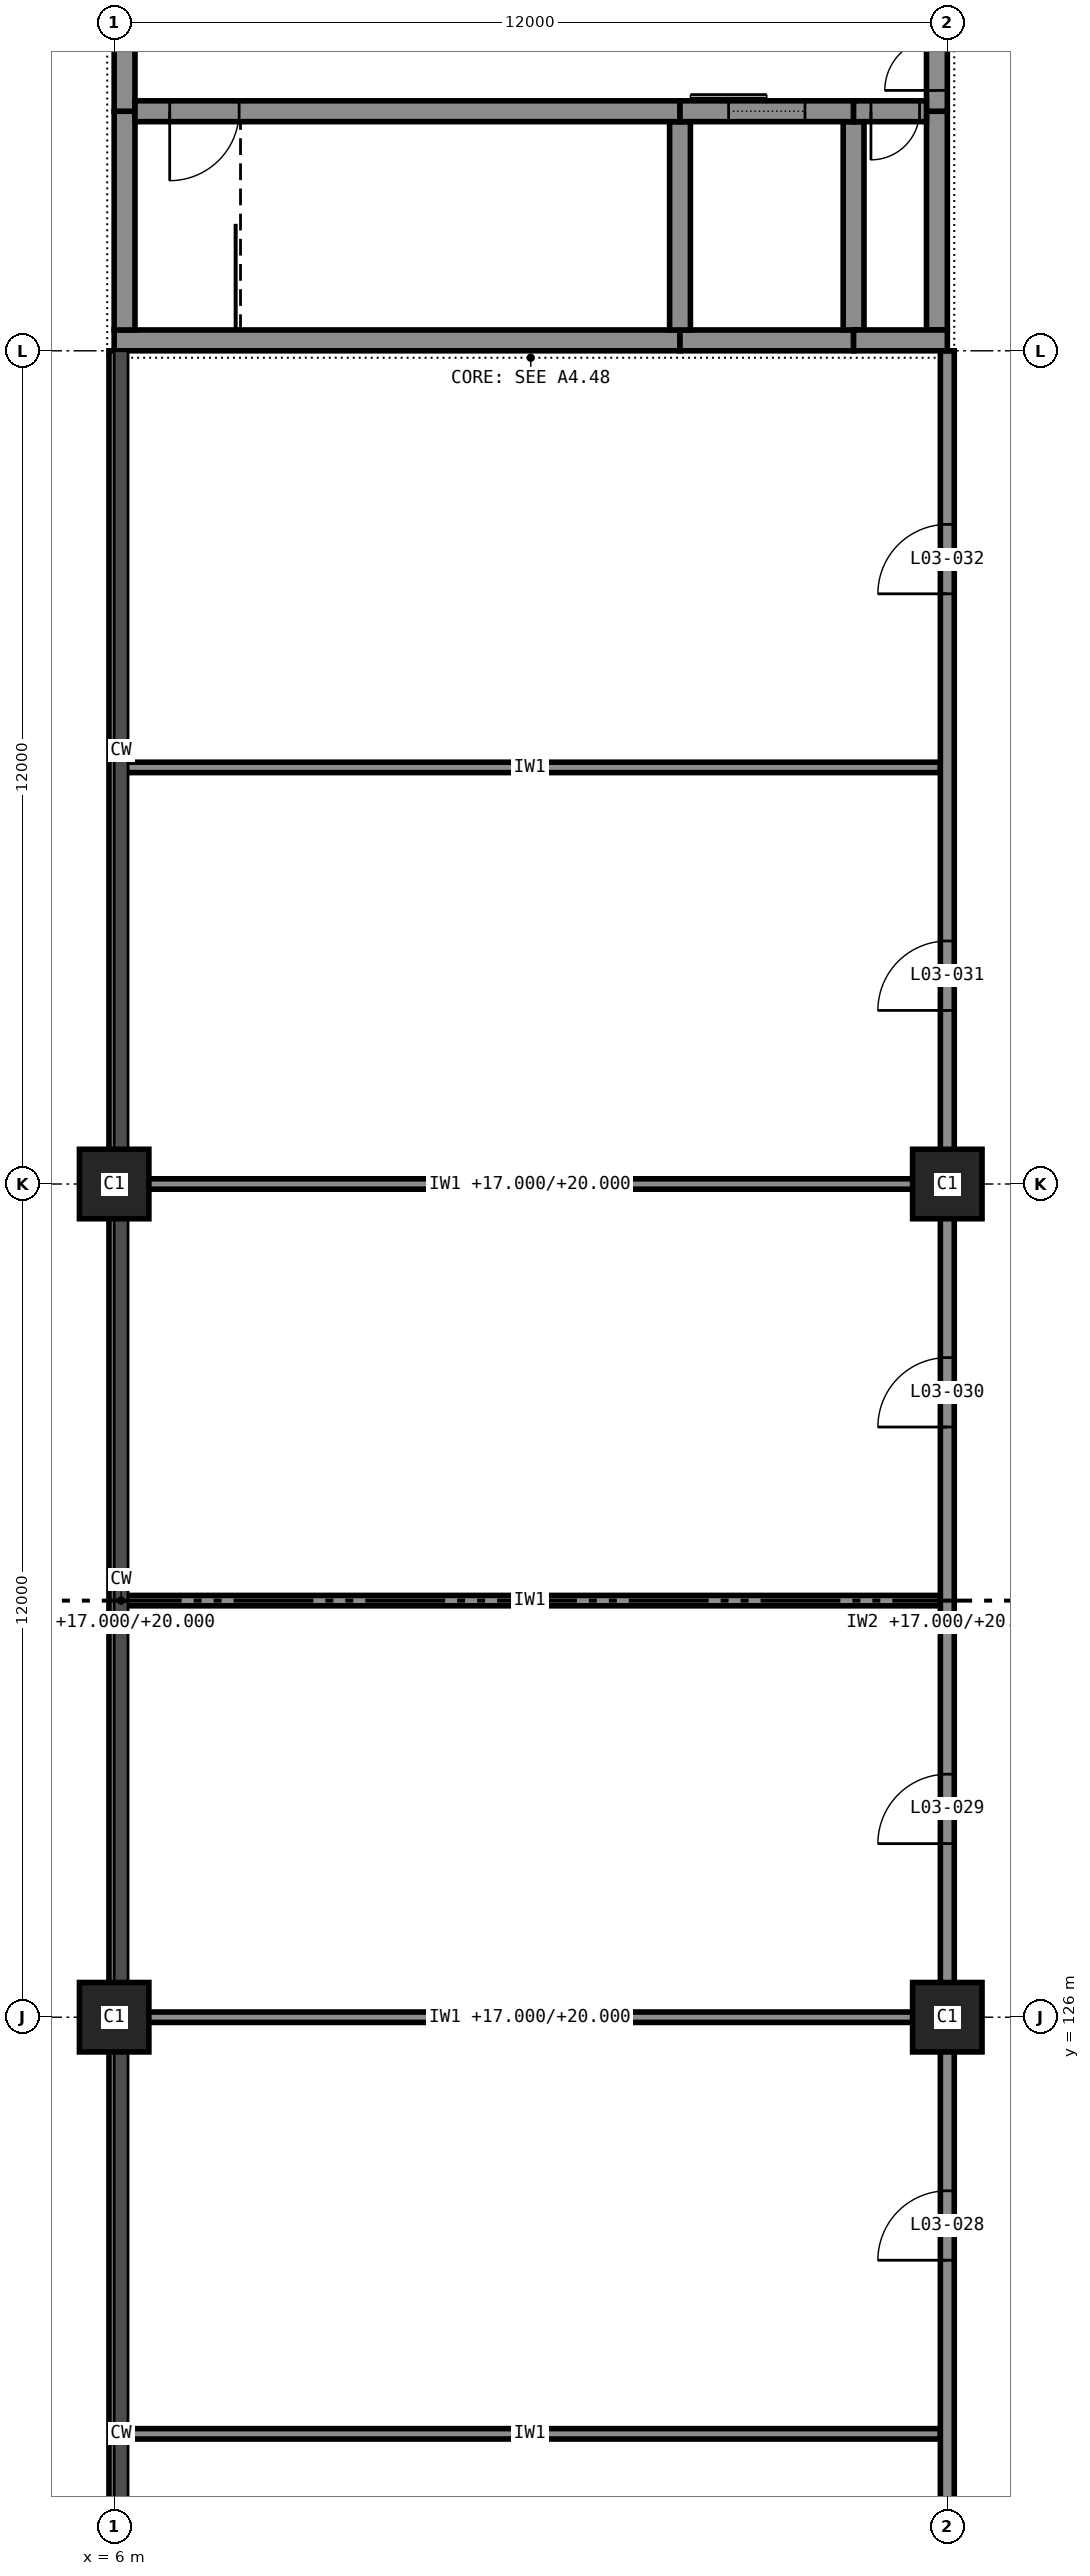
"""IFC4 building model, lengths in metres.
Left out: names, types, materials, properties, quantities, classifications, styles, units other than length and angle.
Written with IfcOpenShell. Run it as: python <this file> out.ifc"""

import sys

from ifc_helpers import new_model, si_unit, direction, frame, frame_2d, origin, origin_2d, place, context, subcontext, project, spatial, rectangle, extrude, element, fill, save


model = new_model("IFC4")
c1 = context("Model", 3, precision=1e-05, world=origin(), true_north=direction((0.0, 1.0)))
c2 = subcontext(c1, "Body", "Model", "MODEL_VIEW")
j1 = project(units=[si_unit("LENGTHUNIT", "METRE"), si_unit("PLANEANGLEUNIT", "RADIAN")], contexts=[c1])
p1 = place(None, origin())
s1 = spatial("IfcSite", under=j1, at=p1, CompositionType="ELEMENT")
p2 = place(p1, origin())
s2 = spatial("IfcBuilding", under=s1, at=p2, CompositionType="ELEMENT")
p3 = place(p2, frame((0.0, 0.0, 17.0)))
s3 = spatial("IfcBuildingStorey", under=s2, at=p3, CompositionType="ELEMENT", Elevation=17.0)
for number, where, z_axis, x_axis in (
    (1, (6.0, 126.0, 0.0), (0.0, 0.0, 1.0), (1.0, 0.0, 0.0)),
    (2, (6.0, 138.0, 0.0), (0.0, 0.0, 1.0), (1.0, 0.0, 0.0)),
    (3, (18.0, 126.0, 0.0), (0.0, 0.0, 1.0), (1.0, 0.0, 0.0)),
    (4, (18.0, 138.0, 0.0), (0.0, 0.0, 1.0), (1.0, 0.0, 0.0)),
):
    element("IfcColumn", number, at=place(p3, frame(where, z_axis=z_axis, x_axis=x_axis)), inside=s3, PredefinedType="COLUMN", context=c2, shape_type="SweptSolid", body=[
        extrude(rectangle(XDim=1.0, YDim=1.0, at=origin_2d()), origin(), (0.0, 0.0, 1.0), 4.0),
    ])
p4 = place(p3, frame((6.0, 150.15, 0.0), z_axis=(0.0, 0.0, 1.0), x_axis=(1.0, 0.0, 0.0)))
e5 = element("IfcWall", 5, at=p4, inside=s3, PredefinedType="SHEAR", context=c2, shape_type="SweptSolid", body=[
    extrude(rectangle(XDim=8.15, YDim=0.3, at=frame_2d((4.075, 0.0))), origin(), (0.0, 0.0, 1.0), 3.8),
])
p5 = place(p3, frame((14.15, 150.15, 0.0), z_axis=(0.0, 0.0, 1.0), x_axis=(1.0, 0.0, 0.0)))
e6 = element("IfcWall", 6, at=p5, inside=s3, PredefinedType="SHEAR", context=c2, shape_type="SweptSolid", body=[
    extrude(rectangle(XDim=2.5, YDim=0.3, at=frame_2d((1.25, 0.0))), origin(), (0.0, 0.0, 1.0), 3.8),
])
p6 = place(p3, frame((16.65, 150.15, 0.0), z_axis=(0.0, 0.0, 1.0), x_axis=(1.0, 0.0, 0.0)))
e7 = element("IfcWall", 7, at=p6, inside=s3, PredefinedType="SHEAR", context=c2, shape_type="SweptSolid", body=[
    extrude(rectangle(XDim=1.35, YDim=0.3, at=frame_2d((0.675, 0.0))), origin(), (0.0, 0.0, 1.0), 3.8),
])
p7 = place(p3, frame((6.3, 153.45, 0.0), z_axis=(0.0, 0.0, 1.0), x_axis=(1.0, 0.0, 0.0)))
e8 = element("IfcWall", 8, at=p7, inside=s3, PredefinedType="SHEAR", context=c2, shape_type="SweptSolid", body=[
    extrude(rectangle(XDim=7.85, YDim=0.3, at=frame_2d((3.925, 0.0))), origin(), (0.0, 0.0, 1.0), 3.8),
])
p8 = place(p7, frame((0.5, 0.0, 0.0)))
e9 = element("IfcOpeningElement", 9, at=p8, cuts=e8, PredefinedType="OPENING", context=c2, shape_type="SweptSolid", body=[
    extrude(rectangle(XDim=1.0, YDim=2.1, at=frame_2d((0.5, 1.05))), frame((0.0, 0.16, 0.0), z_axis=(0.0, -1.0, 0.0), x_axis=(1.0, 0.0, 0.0)), (0.0, 0.0, 1.0), 0.32),
])
p9 = place(p3, frame((14.15, 153.45, 0.0), z_axis=(0.0, 0.0, 1.0), x_axis=(1.0, 0.0, 0.0)))
e10 = element("IfcWall", 10, at=p9, inside=s3, PredefinedType="SHEAR", context=c2, shape_type="SweptSolid", body=[
    extrude(rectangle(XDim=2.5, YDim=0.3, at=frame_2d((1.25, 0.0))), origin(), (0.0, 0.0, 1.0), 3.8),
])
p10 = place(p9, frame((0.7, 0.0, 0.0)))
e11 = element("IfcOpeningElement", 11, at=p10, cuts=e10, PredefinedType="OPENING", context=c2, shape_type="SweptSolid", body=[
    extrude(rectangle(XDim=1.1, YDim=2.1, at=frame_2d((0.55, 1.05))), frame((0.0, 0.16, 0.0), z_axis=(0.0, -1.0, 0.0), x_axis=(1.0, 0.0, 0.0)), (0.0, 0.0, 1.0), 0.32),
])
p11 = place(p3, frame((16.65, 153.45, 0.0), z_axis=(0.0, 0.0, 1.0), x_axis=(1.0, 0.0, 0.0)))
e12 = element("IfcWall", 12, at=p11, inside=s3, PredefinedType="SHEAR", context=c2, shape_type="SweptSolid", body=[
    extrude(rectangle(XDim=1.05, YDim=0.3, at=frame_2d((0.525, 0.0))), origin(), (0.0, 0.0, 1.0), 3.8),
])
p12 = place(p11, frame((0.25, 0.0, 0.0)))
e13 = element("IfcOpeningElement", 13, at=p12, cuts=e12, PredefinedType="OPENING", context=c2, shape_type="SweptSolid", body=[
    extrude(rectangle(XDim=0.7, YDim=2.1, at=frame_2d((0.35, 1.05))), frame((0.0, 0.16, 0.0), z_axis=(0.0, -1.0, 0.0), x_axis=(1.0, 0.0, 0.0)), (0.0, 0.0, 1.0), 0.32),
])
p13 = place(p3, frame((6.15, 150.3, 0.0), z_axis=(0.0, 0.0, 1.0), x_axis=(0.0, 1.0, 0.0)))
e14 = element("IfcWall", 14, at=p13, inside=s3, PredefinedType="SHEAR", context=c2, shape_type="SweptSolid", body=[
    extrude(rectangle(XDim=3.15, YDim=0.3, at=frame_2d((1.575, 0.0))), origin(), (0.0, 0.0, 1.0), 3.8),
])
p14 = place(p3, frame((6.15, 153.45, 0.0), z_axis=(0.0, 0.0, 1.0), x_axis=(0.0, 1.0, 0.0)))
e15 = element("IfcWall", 15, at=p14, inside=s3, PredefinedType="SHEAR", context=c2, shape_type="SweptSolid", body=[
    extrude(rectangle(XDim=5.1, YDim=0.3, at=frame_2d((2.55, 0.0))), origin(), (0.0, 0.0, 1.0), 3.8),
])
p15 = place(p3, frame((17.85, 150.3, 0.0), z_axis=(0.0, 0.0, 1.0), x_axis=(0.0, 1.0, 0.0)))
e16 = element("IfcWall", 16, at=p15, inside=s3, PredefinedType="SHEAR", context=c2, shape_type="SweptSolid", body=[
    extrude(rectangle(XDim=3.15, YDim=0.3, at=frame_2d((1.575, 0.0))), origin(), (0.0, 0.0, 1.0), 3.8),
])
p16 = place(p3, frame((17.85, 153.45, 0.0), z_axis=(0.0, 0.0, 1.0), x_axis=(0.0, 1.0, 0.0)))
e17 = element("IfcWall", 17, at=p16, inside=s3, PredefinedType="SHEAR", context=c2, shape_type="SweptSolid", body=[
    extrude(rectangle(XDim=5.1, YDim=0.3, at=frame_2d((2.55, 0.0))), origin(), (0.0, 0.0, 1.0), 3.8),
])
p17 = place(p16, frame((0.3, 0.0, 0.0)))
e18 = element("IfcOpeningElement", 18, at=p17, cuts=e17, PredefinedType="OPENING", context=c2, shape_type="SweptSolid", body=[
    extrude(rectangle(XDim=1.5, YDim=2.1, at=frame_2d((0.75, 1.05))), frame((0.0, 0.16, 0.0), z_axis=(0.0, -1.0, 0.0), x_axis=(1.0, 0.0, 0.0)), (0.0, 0.0, 1.0), 0.32),
])
for number, where, z_axis, x_axis in (
    (19, (14.15, 150.3, 0.0), (0.0, 0.0, 1.0), (0.0, 1.0, 0.0)),
    (20, (16.65, 150.3, 0.0), (0.0, 0.0, 1.0), (0.0, 1.0, 0.0)),
):
    element("IfcWall", number, at=place(p3, frame(where, z_axis=z_axis, x_axis=x_axis)), inside=s3, PredefinedType="SHEAR", context=c2, shape_type="SweptSolid", body=[
        extrude(rectangle(XDim=3.0, YDim=0.3, at=frame_2d((1.5, 0.0))), origin(), (0.0, 0.0, 1.0), 3.8),
    ])
p18 = place(p3, frame((6.075, 120.0, 0.0), z_axis=(0.0, 0.0, 1.0), x_axis=(1.0, 0.0, 0.0)))
e21 = element("IfcWall", 21, at=p18, inside=s3, PredefinedType="PARTITIONING", context=c2, shape_type="SweptSolid", body=[
    extrude(rectangle(XDim=11.825, YDim=0.15, at=frame_2d((5.913, 0.0))), origin(), (0.0, 0.0, 1.0), 3.8),
])
p19 = place(p3, frame((6.075, 126.0, 0.0), z_axis=(0.0, 0.0, 1.0), x_axis=(1.0, 0.0, 0.0)))
e22 = element("IfcWall", 22, at=p19, inside=s3, PredefinedType="PARTITIONING", context=c2, shape_type="SweptSolid", body=[
    extrude(rectangle(XDim=11.825, YDim=0.15, at=frame_2d((5.913, 0.0))), origin(), (0.0, 0.0, 1.0), 3.0),
])
p20 = place(p3, frame((6.075, 132.0, 0.0), z_axis=(0.0, 0.0, 1.0), x_axis=(1.0, 0.0, 0.0)))
e23 = element("IfcWall", 23, at=p20, inside=s3, PredefinedType="PARTITIONING", context=c2, shape_type="SweptSolid", body=[
    extrude(rectangle(XDim=11.825, YDim=0.15, at=frame_2d((5.913, 0.0))), origin(), (0.0, 0.0, 1.0), 3.8),
])
p21 = place(p3, frame((6.075, 138.0, 0.0), z_axis=(0.0, 0.0, 1.0), x_axis=(1.0, 0.0, 0.0)))
e24 = element("IfcWall", 24, at=p21, inside=s3, PredefinedType="PARTITIONING", context=c2, shape_type="SweptSolid", body=[
    extrude(rectangle(XDim=11.825, YDim=0.15, at=frame_2d((5.913, 0.0))), origin(), (0.0, 0.0, 1.0), 3.0),
])
p22 = place(p3, frame((6.075, 144.0, 0.0), z_axis=(0.0, 0.0, 1.0), x_axis=(1.0, 0.0, 0.0)))
e25 = element("IfcWall", 25, at=p22, inside=s3, PredefinedType="PARTITIONING", context=c2, shape_type="SweptSolid", body=[
    extrude(rectangle(XDim=11.825, YDim=0.15, at=frame_2d((5.913, 0.0))), origin(), (0.0, 0.0, 1.0), 3.8),
])
p23 = place(p3, frame((6.0, 102.0, 0.0), z_axis=(0.0, 0.0, 1.0), x_axis=(0.0, 1.0, 0.0)))
e26 = element("IfcWall", 26, at=p23, inside=s3, PredefinedType="PARTITIONING", context=c2, shape_type="SweptSolid", body=[
    extrude(rectangle(XDim=48.0, YDim=0.15, at=frame_2d((24.0, 0.0))), origin(), (0.0, 0.0, 1.0), 3.0),
])
p24 = place(p3, frame((18.0, 102.0, 0.0), z_axis=(0.0, 0.0, 1.0), x_axis=(0.0, 1.0, 0.0)))
e27 = element("IfcWall", 27, at=p24, inside=s3, PredefinedType="PARTITIONING", context=c2, shape_type="SweptSolid", body=[
    extrude(rectangle(XDim=48.0, YDim=0.2, at=frame_2d((24.0, 0.0))), origin(), (0.0, 0.0, 1.0), 3.0),
])
p25 = place(p24, frame((2.5, 0.0, 0.0)))
e28 = element("IfcOpeningElement", 28, at=p25, cuts=e27, PredefinedType="OPENING", context=c2, shape_type="SweptSolid", body=[
    extrude(rectangle(XDim=1.0, YDim=2.1, at=frame_2d((0.5, 1.05))), frame((0.0, 0.11, 0.0), z_axis=(0.0, -1.0, 0.0), x_axis=(1.0, 0.0, 0.0)), (0.0, 0.0, 1.0), 0.22),
])
p26 = place(p24, frame((8.5, 0.0, 0.0)))
e29 = element("IfcOpeningElement", 29, at=p26, cuts=e27, PredefinedType="OPENING", context=c2, shape_type="SweptSolid", body=[
    extrude(rectangle(XDim=1.0, YDim=2.1, at=frame_2d((0.5, 1.05))), frame((0.0, 0.11, 0.0), z_axis=(0.0, -1.0, 0.0), x_axis=(1.0, 0.0, 0.0)), (0.0, 0.0, 1.0), 0.22),
])
p27 = place(p24, frame((14.5, 0.0, 0.0)))
e30 = element("IfcOpeningElement", 30, at=p27, cuts=e27, PredefinedType="OPENING", context=c2, shape_type="SweptSolid", body=[
    extrude(rectangle(XDim=1.0, YDim=2.1, at=frame_2d((0.5, 1.05))), frame((0.0, 0.11, 0.0), z_axis=(0.0, -1.0, 0.0), x_axis=(1.0, 0.0, 0.0)), (0.0, 0.0, 1.0), 0.22),
])
p28 = place(p24, frame((20.5, 0.0, 0.0)))
e31 = element("IfcOpeningElement", 31, at=p28, cuts=e27, PredefinedType="OPENING", context=c2, shape_type="SweptSolid", body=[
    extrude(rectangle(XDim=1.0, YDim=2.1, at=frame_2d((0.5, 1.05))), frame((0.0, 0.11, 0.0), z_axis=(0.0, -1.0, 0.0), x_axis=(1.0, 0.0, 0.0)), (0.0, 0.0, 1.0), 0.22),
])
p29 = place(p24, frame((26.5, 0.0, 0.0)))
e32 = element("IfcOpeningElement", 32, at=p29, cuts=e27, PredefinedType="OPENING", context=c2, shape_type="SweptSolid", body=[
    extrude(rectangle(XDim=1.0, YDim=2.1, at=frame_2d((0.5, 1.05))), frame((0.0, 0.11, 0.0), z_axis=(0.0, -1.0, 0.0), x_axis=(1.0, 0.0, 0.0)), (0.0, 0.0, 1.0), 0.22),
])
p30 = place(p24, frame((32.5, 0.0, 0.0)))
e33 = element("IfcOpeningElement", 33, at=p30, cuts=e27, PredefinedType="OPENING", context=c2, shape_type="SweptSolid", body=[
    extrude(rectangle(XDim=1.0, YDim=2.1, at=frame_2d((0.5, 1.05))), frame((0.0, 0.11, 0.0), z_axis=(0.0, -1.0, 0.0), x_axis=(1.0, 0.0, 0.0)), (0.0, 0.0, 1.0), 0.22),
])
p31 = place(p24, frame((38.5, 0.0, 0.0)))
e34 = element("IfcOpeningElement", 34, at=p31, cuts=e27, PredefinedType="OPENING", context=c2, shape_type="SweptSolid", body=[
    extrude(rectangle(XDim=1.0, YDim=2.1, at=frame_2d((0.5, 1.05))), frame((0.0, 0.11, 0.0), z_axis=(0.0, -1.0, 0.0), x_axis=(1.0, 0.0, 0.0)), (0.0, 0.0, 1.0), 0.22),
])
p32 = place(p24, frame((44.5, 0.0, 0.0)))
e35 = element("IfcOpeningElement", 35, at=p32, cuts=e27, PredefinedType="OPENING", context=c2, shape_type="SweptSolid", body=[
    extrude(rectangle(XDim=1.0, YDim=2.1, at=frame_2d((0.5, 1.05))), frame((0.0, 0.11, 0.0), z_axis=(0.0, -1.0, 0.0), x_axis=(1.0, 0.0, 0.0)), (0.0, 0.0, 1.0), 0.22),
])
p33 = place(p28, origin())
e36 = element("IfcDoor", 36, at=p33, inside=s3, OperationType="SINGLE_SWING_RIGHT", PredefinedType="DOOR", context=c2, shape_type="SweptSolid", body=[
    extrude(rectangle(XDim=1.0, YDim=2.1, at=frame_2d((0.5, 1.05))), frame((0.0, 0.025, 0.0), z_axis=(0.0, -1.0, 0.0), x_axis=(1.0, 0.0, 0.0)), (0.0, 0.0, 1.0), 0.05),
])
fill(e31, e36)
p34 = place(p29, origin())
e37 = element("IfcDoor", 37, at=p34, inside=s3, OperationType="SINGLE_SWING_RIGHT", PredefinedType="DOOR", context=c2, shape_type="SweptSolid", body=[
    extrude(rectangle(XDim=1.0, YDim=2.1, at=frame_2d((0.5, 1.05))), frame((0.0, 0.025, 0.0), z_axis=(0.0, -1.0, 0.0), x_axis=(1.0, 0.0, 0.0)), (0.0, 0.0, 1.0), 0.05),
])
fill(e32, e37)
p35 = place(p30, origin())
e38 = element("IfcDoor", 38, at=p35, inside=s3, OperationType="SINGLE_SWING_RIGHT", PredefinedType="DOOR", context=c2, shape_type="SweptSolid", body=[
    extrude(rectangle(XDim=1.0, YDim=2.1, at=frame_2d((0.5, 1.05))), frame((0.0, 0.025, 0.0), z_axis=(0.0, -1.0, 0.0), x_axis=(1.0, 0.0, 0.0)), (0.0, 0.0, 1.0), 0.05),
])
fill(e33, e38)
p36 = place(p31, origin())
e39 = element("IfcDoor", 39, at=p36, inside=s3, OperationType="SINGLE_SWING_RIGHT", PredefinedType="DOOR", context=c2, shape_type="SweptSolid", body=[
    extrude(rectangle(XDim=1.0, YDim=2.1, at=frame_2d((0.5, 1.05))), frame((0.0, 0.025, 0.0), z_axis=(0.0, -1.0, 0.0), x_axis=(1.0, 0.0, 0.0)), (0.0, 0.0, 1.0), 0.05),
])
fill(e34, e39)
p37 = place(p32, origin())
e40 = element("IfcDoor", 40, at=p37, inside=s3, OperationType="SINGLE_SWING_RIGHT", PredefinedType="DOOR", context=c2, shape_type="SweptSolid", body=[
    extrude(rectangle(XDim=1.0, YDim=2.1, at=frame_2d((0.5, 1.05))), frame((0.0, 0.025, 0.0), z_axis=(0.0, -1.0, 0.0), x_axis=(1.0, 0.0, 0.0)), (0.0, 0.0, 1.0), 0.05),
])
fill(e35, e40)
p38 = place(p8, frame((1.0, 0.0, 0.0), z_axis=(0.0, 0.0, 1.0), x_axis=(-1.0, 0.0, 0.0)))
e41 = element("IfcDoor", 41, at=p38, inside=s3, OperationType="SINGLE_SWING_LEFT", PredefinedType="DOOR", context=c2, shape_type="SweptSolid", body=[
    extrude(rectangle(XDim=1.0, YDim=2.1, at=frame_2d((0.5, 1.05))), frame((0.0, 0.025, 0.0), z_axis=(0.0, -1.0, 0.0), x_axis=(1.0, 0.0, 0.0)), (0.0, 0.0, 1.0), 0.05),
])
fill(e9, e41)
p39 = place(p10, origin())
e42 = element("IfcDoor", 42, at=p39, inside=s3, OperationType="SLIDING_TO_LEFT", PredefinedType="DOOR", context=c2, shape_type="SweptSolid", body=[
    extrude(rectangle(XDim=1.1, YDim=2.1, at=frame_2d((0.55, 1.05))), frame((0.0, 0.025, 0.0), z_axis=(0.0, -1.0, 0.0), x_axis=(1.0, 0.0, 0.0)), (0.0, 0.0, 1.0), 0.05),
])
fill(e11, e42)
p40 = place(p12, frame((0.7, 0.0, 0.0), z_axis=(0.0, 0.0, 1.0), x_axis=(-1.0, 0.0, 0.0)))
e43 = element("IfcDoor", 43, at=p40, inside=s3, OperationType="SINGLE_SWING_LEFT", PredefinedType="DOOR", context=c2, shape_type="SweptSolid", body=[
    extrude(rectangle(XDim=0.7, YDim=2.1, at=frame_2d((0.35, 1.05))), frame((0.0, 0.025, 0.0), z_axis=(0.0, -1.0, 0.0), x_axis=(1.0, 0.0, 0.0)), (0.0, 0.0, 1.0), 0.05),
])
fill(e13, e43)
p41 = place(p17, origin())
e44 = element("IfcDoor", 44, at=p41, inside=s3, OperationType="DOUBLE_DOOR_SINGLE_SWING", PredefinedType="DOOR", context=c2, shape_type="SweptSolid", body=[
    extrude(rectangle(XDim=1.5, YDim=2.1, at=frame_2d((0.75, 1.05))), frame((0.0, 0.025, 0.0), z_axis=(0.0, -1.0, 0.0), x_axis=(1.0, 0.0, 0.0)), (0.0, 0.0, 1.0), 0.05),
])
fill(e18, e44)
save(model, sys.argv[1])
